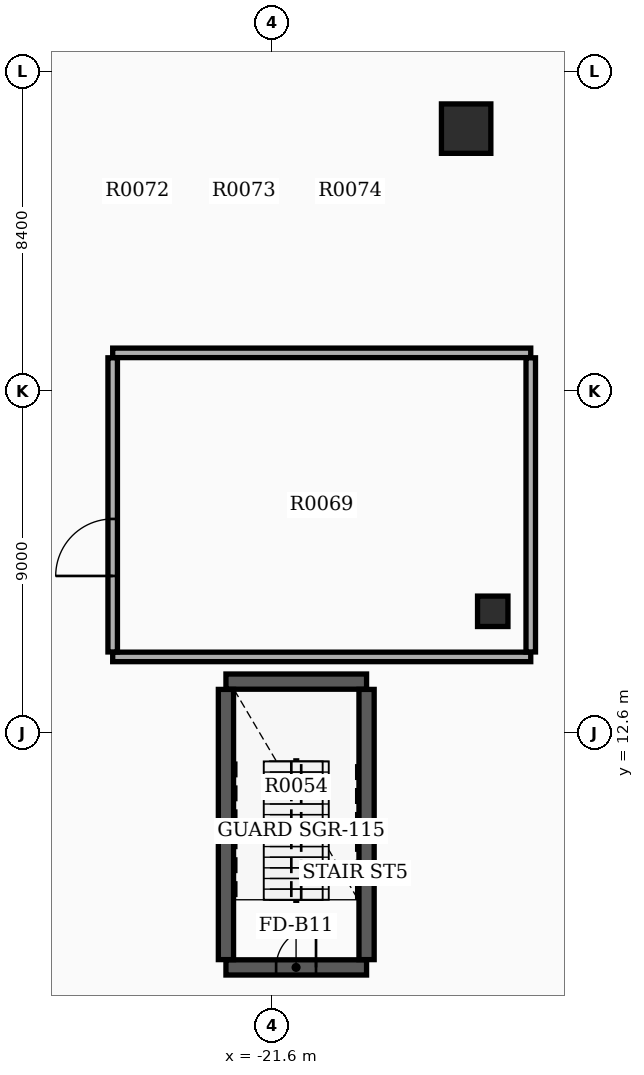
"""IFC4 building model, lengths in metres.
Left out: names, types, materials, properties, quantities, classifications, styles, units other than length and angle.
Written with IfcOpenShell. Run it as: python <this file> out.ifc"""

import sys

from ifc_helpers import new_model, si_unit, direction, frame, frame_2d, origin, origin_2d, place, context, subcontext, project, spatial, rectangle, circle, extrude, element, fill, save


model = new_model("IFC4")
c1 = context("Model", 3, precision=1e-05, world=origin(), true_north=direction((0.0, 1.0)))
c2 = subcontext(c1, "Body", "Model", "MODEL_VIEW")
j1 = project(units=[si_unit("LENGTHUNIT", "METRE"), si_unit("PLANEANGLEUNIT", "RADIAN")], contexts=[c1])
p1 = place(None, origin())
s1 = spatial("IfcSite", under=j1, at=p1, CompositionType="ELEMENT")
p2 = place(p1, origin())
s2 = spatial("IfcBuilding", under=s1, at=p2, CompositionType="ELEMENT")
p3 = place(p2, frame((0.0, 0.0, -5.2)))
s3 = spatial("IfcBuildingStorey", under=s2, at=p3, CompositionType="ELEMENT", Elevation=-5.2)
p4 = place(p3, frame((-15.8, 15.8, 0.0), z_axis=(0.0, 0.0, 1.0), x_axis=(1.0, 0.0, 0.0)))
e1 = element("IfcColumn", 1, at=p4, inside=s3, PredefinedType="COLUMN", context=c2, shape_type="SweptSolid", body=[
    extrude(rectangle(XDim=0.8, YDim=0.8, at=origin_2d()), origin(), (0.0, 0.0, 1.0), 5.2),
])
p5 = place(p3, frame((-22.82, 13.95, 0.0), z_axis=(0.0, 0.0, 1.0), x_axis=(1.0, 0.0, 0.0)))
e2 = element("IfcWall", 2, at=p5, inside=s3, PredefinedType="SHEAR", context=c2, shape_type="SweptSolid", body=[
    extrude(rectangle(XDim=3.7, YDim=0.4, at=frame_2d((1.85, 0.0))), origin(), (0.0, 0.0, 1.0), 4.95),
])
p6 = place(p3, frame((-22.82, 6.43, 0.0), z_axis=(0.0, 0.0, 1.0), x_axis=(1.0, 0.0, 0.0)))
e3 = element("IfcWall", 3, at=p6, inside=s3, PredefinedType="SHEAR", context=c2, shape_type="SweptSolid", body=[
    extrude(rectangle(XDim=3.7, YDim=0.4, at=frame_2d((1.85, 0.0))), origin(), (0.0, 0.0, 1.0), 4.95),
])
p7 = place(p6, frame((1.32, 0.0, 0.0)))
e4 = element("IfcOpeningElement", 4, at=p7, cuts=e3, PredefinedType="OPENING", context=c2, shape_type="SweptSolid", body=[
    extrude(rectangle(XDim=1.05, YDim=2.15, at=frame_2d((0.525, 1.075))), frame((0.0, 0.21, 0.0), z_axis=(0.0, -1.0, 0.0), x_axis=(1.0, 0.0, 0.0)), (0.0, 0.0, 1.0), 0.42),
])
for number, where, z_axis, x_axis in (
    (5, (-22.82, 6.635, 0.0), (0.0, 0.0, 1.0), (0.0, 1.0, 0.0)),
    (6, (-19.12, 6.635, 0.0), (0.0, 0.0, 1.0), (0.0, 1.0, 0.0)),
):
    element("IfcWall", number, at=place(p3, frame(where, z_axis=z_axis, x_axis=x_axis)), inside=s3, PredefinedType="SHEAR", context=c2, shape_type="SweptSolid", body=[
        extrude(rectangle(XDim=7.11, YDim=0.4, at=frame_2d((3.555, 0.0))), origin(), (0.0, 0.0, 1.0), 4.95),
    ])
p8 = place(p3, frame((-16.5, 28.5, 0.0), z_axis=(0.0, 0.0, 1.0), x_axis=(1.0, 0.0, 0.0)))
e7 = element("IfcColumn", 7, at=p8, inside=s3, PredefinedType="COLUMN", context=c2, shape_type="SweptSolid", body=[
    extrude(circle(Radius=0.65, at=origin_2d()), origin(), (0.0, 0.0, 1.0), 5.2),
])
for number, where, z_axis, x_axis in (
    (8, (-25.8, 14.6, 0.0), (0.0, 0.0, 1.0), (1.0, 0.0, 0.0)),
    (9, (-25.8, 22.6, 0.0), (0.0, 0.0, 1.0), (1.0, 0.0, 0.0)),
):
    element("IfcWall", number, at=place(p3, frame(where, z_axis=z_axis, x_axis=x_axis)), inside=s3, PredefinedType="SOLIDWALL", context=c2, shape_type="SweptSolid", body=[
        extrude(rectangle(XDim=11.0, YDim=0.25, at=frame_2d((5.5, 0.0))), origin(), (0.0, 0.0, 1.0), 3.97),
    ])
p9 = place(p3, frame((-25.8, 14.73, 0.0), z_axis=(0.0, 0.0, 1.0), x_axis=(0.0, 1.0, 0.0)))
e10 = element("IfcWall", 10, at=p9, inside=s3, PredefinedType="SOLIDWALL", context=c2, shape_type="SweptSolid", body=[
    extrude(rectangle(XDim=7.74, YDim=0.25, at=frame_2d((3.87, 0.0))), origin(), (0.0, 0.0, 1.0), 3.97),
])
p10 = place(p9, frame((2.0, 0.0, 0.0)))
e11 = element("IfcOpeningElement", 11, at=p10, cuts=e10, PredefinedType="OPENING", context=c2, shape_type="SweptSolid", body=[
    extrude(rectangle(XDim=1.5, YDim=2.15, at=frame_2d((0.75, 1.075))), frame((0.0, 0.135, 0.0), z_axis=(0.0, -1.0, 0.0), x_axis=(1.0, 0.0, 0.0)), (0.0, 0.0, 1.0), 0.27),
])
p11 = place(p3, frame((-14.8, 14.73, 0.0), z_axis=(0.0, 0.0, 1.0), x_axis=(0.0, 1.0, 0.0)))
e12 = element("IfcWall", 12, at=p11, inside=s3, PredefinedType="SOLIDWALL", context=c2, shape_type="SweptSolid", body=[
    extrude(rectangle(XDim=7.74, YDim=0.25, at=frame_2d((3.87, 0.0))), origin(), (0.0, 0.0, 1.0), 3.97),
])
p12 = place(p7, origin())
e13 = element("IfcDoor", 13, at=p12, inside=s3, OperationType="SINGLE_SWING_RIGHT", PredefinedType="DOOR", context=c2, shape_type="SweptSolid", body=[
    extrude(rectangle(XDim=1.05, YDim=2.15, at=frame_2d((0.525, 1.075))), frame((0.0, 0.025, 0.0), z_axis=(0.0, -1.0, 0.0), x_axis=(1.0, 0.0, 0.0)), (0.0, 0.0, 1.0), 0.05),
])
fill(e4, e13)
p13 = place(p10, origin())
e14 = element("IfcDoor", 14, at=p13, inside=s3, OperationType="DOUBLE_DOOR_SINGLE_SWING", PredefinedType="DOOR", context=c2, shape_type="SweptSolid", body=[
    extrude(rectangle(XDim=1.5, YDim=2.15, at=frame_2d((0.75, 1.075))), frame((0.0, 0.025, 0.0), z_axis=(0.0, -1.0, 0.0), x_axis=(1.0, 0.0, 0.0)), (0.0, 0.0, 1.0), 0.05),
])
fill(e11, e14)
save(model, sys.argv[1])
